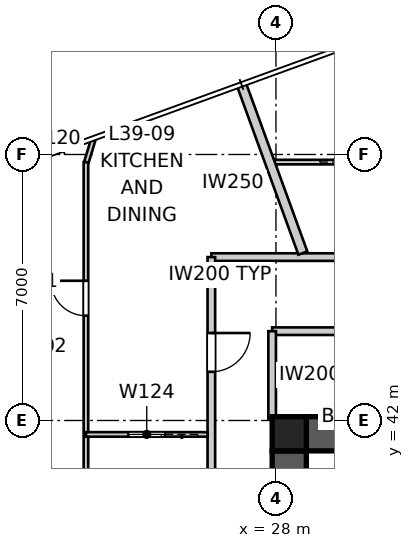
"""IFC4 building model, lengths in metres.
Left out: names, types, materials, properties, quantities, classifications, styles, units other than length and angle.
Written with IfcOpenShell. Run it as: python <this file> out.ifc"""

import sys

from ifc_helpers import new_model, si_unit, direction, frame, frame_2d, origin, origin_2d, place, context, subcontext, project, spatial, polyline, rectangle, outline, extrude, element, fill, save


model = new_model("IFC4")
c1 = context("Model", 3, precision=1e-05, world=origin(), true_north=direction((0.0, 1.0)))
c2 = subcontext(c1, "Body", "Model", "MODEL_VIEW")
j1 = project(units=[si_unit("LENGTHUNIT", "METRE"), si_unit("PLANEANGLEUNIT", "RADIAN")], contexts=[c1])
p1 = place(None, origin())
s1 = spatial("IfcSite", under=j1, at=p1, CompositionType="ELEMENT")
p2 = place(p1, origin())
s2 = spatial("IfcBuilding", under=s1, at=p2, CompositionType="ELEMENT")
p3 = place(p2, frame((0.0, 0.0, 143.8)))
s3 = spatial("IfcBuildingStorey", under=s2, at=p3, CompositionType="ELEMENT", Elevation=143.8)
p4 = place(p3, frame((28.8, 41.65, 0.0), z_axis=(0.0, 0.0, 1.0), x_axis=(1.0, 0.0, 0.0)))
e1 = element("IfcWall", 1, at=p4, inside=s3, PredefinedType="SHEAR", context=c2, shape_type="SweptSolid", body=[
    extrude(outline(polyline([(0.0, -0.45), (22.4, -0.45), (22.4, -0.025), (22.85, -0.025), (22.85, 0.025), (22.4, 0.025), (22.4, 0.45), (0.0, 0.45), (0.0, 0.025), (-0.45, 0.025), (-0.45, -0.025), (0.0, -0.025), (0.0, -0.45)])), origin(), (0.0, 0.0, 1.0), 3.4),
])
p5 = place(p3, frame((28.35, 41.2, 0.0), z_axis=(0.0, 0.0, 1.0), x_axis=(0.0, -1.0, 0.0)))
e2 = element("IfcWall", 2, at=p5, inside=s3, PredefinedType="SHEAR", context=c2, shape_type="SweptSolid", body=[
    extrude(outline(polyline([(0.0, -0.45), (22.4, -0.45), (22.4, -0.025), (22.85, -0.025), (22.85, 0.025), (22.4, 0.025), (22.4, 0.45), (0.0, 0.45), (0.0, 0.025), (-0.45, 0.025), (-0.45, -0.025), (0.0, -0.025), (0.0, -0.45)])), origin(), (0.0, 0.0, 1.0), 3.4),
])
p6 = place(p5, frame((11.14, 0.0, 0.0)))
e3 = element("IfcOpeningElement", 3, at=p6, cuts=e2, PredefinedType="OPENING", context=c2, shape_type="SweptSolid", body=[
    extrude(rectangle(XDim=1.02, YDim=2.4, at=frame_2d((0.51, 1.2))), frame((0.0, 0.46, 0.0), z_axis=(0.0, -1.0, 0.0), x_axis=(1.0, 0.0, 0.0)), (0.0, 0.0, 1.0), 0.92),
])
p7 = place(p3, frame((28.35, 41.65, 0.0), z_axis=(0.0, 0.0, 1.0), x_axis=(1.0, 0.0, 0.0)))
e4 = element("IfcColumn", 4, at=p7, inside=s3, PredefinedType="COLUMN", context=c2, shape_type="SweptSolid", body=[
    extrude(rectangle(XDim=0.9, YDim=0.9, at=origin_2d()), origin(), (0.0, 0.0, 1.0), 3.4),
])
p8 = place(p3, frame((30.758, 46.3, 0.0), z_axis=(0.0, 0.0, 1.0), x_axis=(-1.0, 0.0, 0.0)))
e5 = element("IfcWall", 5, at=p8, inside=s3, PredefinedType="PARTITIONING", context=c2, shape_type="SweptSolid", body=[
    extrude(rectangle(XDim=4.458, YDim=0.2, at=frame_2d((2.229, 0.0))), origin(), (0.0, 0.0, 1.0), 3.25),
])
p9 = place(p3, frame((26.3, 46.3, 0.0), z_axis=(0.0, 0.0, 1.0), x_axis=(0.0, -1.0, 0.0)))
e6 = element("IfcWall", 6, at=p9, inside=s3, PredefinedType="PARTITIONING", context=c2, shape_type="SweptSolid", body=[
    extrude(rectangle(XDim=33.0, YDim=0.2, at=frame_2d((16.5, 0.0))), origin(), (0.0, 0.0, 1.0), 3.25),
])
p10 = place(p9, frame((13.229, 0.0, 0.0)))
e7 = element("IfcOpeningElement", 7, at=p10, cuts=e6, PredefinedType="OPENING", context=c2, shape_type="SweptSolid", body=[
    extrude(rectangle(XDim=1.02, YDim=2.34, at=frame_2d((0.51, 1.17))), frame((0.0, 0.11, 0.0), z_axis=(0.0, -1.0, 0.0), x_axis=(1.0, 0.0, 0.0)), (0.0, 0.0, 1.0), 0.22),
])
p11 = place(p9, frame((28.51, 0.0, 0.0)))
e8 = element("IfcOpeningElement", 8, at=p11, cuts=e6, PredefinedType="OPENING", context=c2, shape_type="SweptSolid", body=[
    extrude(rectangle(XDim=1.02, YDim=2.34, at=frame_2d((0.51, 1.17))), frame((0.0, 0.11, 0.0), z_axis=(0.0, -1.0, 0.0), x_axis=(1.0, 0.0, 0.0)), (0.0, 0.0, 1.0), 0.22),
])
p12 = place(p9, frame((1.998, 0.0, 0.0)))
e9 = element("IfcOpeningElement", 9, at=p12, cuts=e6, PredefinedType="OPENING", context=c2, shape_type="SweptSolid", body=[
    extrude(rectangle(XDim=1.02, YDim=2.34, at=frame_2d((0.51, 1.17))), frame((0.0, 0.11, 0.0), z_axis=(0.0, -1.0, 0.0), x_axis=(1.0, 0.0, 0.0)), (0.0, 0.0, 1.0), 0.22),
])
p13 = place(p3, frame((27.093, 50.843, 0.0), z_axis=(0.0, 0.0, 1.0), x_axis=(0.342012883883, -0.939695262975, 0.0)))
e10 = element("IfcWall", 10, at=p13, inside=s3, PredefinedType="PARTITIONING", context=c2, shape_type="SweptSolid", body=[
    extrude(rectangle(XDim=4.722, YDim=0.25, at=frame_2d((2.361, 0.0))), origin(), (0.0, 0.0, 1.0), 3.25),
])
p14 = place(p3, frame((52.1, 44.35, 0.0), z_axis=(0.0, 0.0, 1.0), x_axis=(-1.0, 0.0, 0.0)))
e11 = element("IfcWall", 11, at=p14, inside=s3, PredefinedType="PARTITIONING", context=c2, shape_type="SweptSolid", body=[
    extrude(rectangle(XDim=24.2, YDim=0.2, at=frame_2d((12.1, 0.0))), origin(), (0.0, 0.0, 1.0), 3.25),
])
p15 = place(p14, frame((10.743, 0.0, 0.0)))
e12 = element("IfcOpeningElement", 12, at=p15, cuts=e11, PredefinedType="OPENING", context=c2, shape_type="SweptSolid", body=[
    extrude(rectangle(XDim=1.02, YDim=2.1, at=frame_2d((0.51, 1.05))), frame((0.0, 0.11, 0.0), z_axis=(0.0, -1.0, 0.0), x_axis=(1.0, 0.0, 0.0)), (0.0, 0.0, 1.0), 0.22),
])
p16 = place(p14, frame((19.636, 0.0, 0.0)))
e13 = element("IfcOpeningElement", 13, at=p16, cuts=e11, PredefinedType="OPENING", context=c2, shape_type="SweptSolid", body=[
    extrude(rectangle(XDim=1.02, YDim=2.1, at=frame_2d((0.51, 1.05))), frame((0.0, 0.11, 0.0), z_axis=(0.0, -1.0, 0.0), x_axis=(1.0, 0.0, 0.0)), (0.0, 0.0, 1.0), 0.22),
])
p17 = place(p14, frame((3.297, 0.0, 0.0)))
e14 = element("IfcOpeningElement", 14, at=p17, cuts=e11, PredefinedType="OPENING", context=c2, shape_type="SweptSolid", body=[
    extrude(rectangle(XDim=1.02, YDim=2.1, at=frame_2d((0.51, 1.05))), frame((0.0, 0.11, 0.0), z_axis=(0.0, -1.0, 0.0), x_axis=(1.0, 0.0, 0.0)), (0.0, 0.0, 1.0), 0.22),
])
p18 = place(p3, frame((27.9, 44.35, 0.0), z_axis=(0.0, 0.0, 1.0), x_axis=(0.0, -1.0, 0.0)))
e15 = element("IfcWall", 15, at=p18, inside=s3, PredefinedType="PARTITIONING", context=c2, shape_type="SweptSolid", body=[
    extrude(rectangle(XDim=2.3, YDim=0.2, at=frame_2d((1.15, 0.0))), origin(), (0.0, 0.0, 1.0), 3.25),
])
p19 = place(p3, frame((23.0, 10.8, 0.0), z_axis=(0.0, 0.0, 1.0), x_axis=(0.0, 1.0, 0.0)))
e16 = element("IfcWall", 16, at=p19, inside=s3, PredefinedType="PARTITIONING", context=c2, shape_type="SweptSolid", body=[
    extrude(rectangle(XDim=38.0, YDim=0.12, at=frame_2d((19.0, 0.0))), origin(), (0.0, 0.0, 1.0), 2.55),
])
p20 = place(p19, frame((20.674, 0.0, 0.0)))
e17 = element("IfcOpeningElement", 17, at=p20, cuts=e16, PredefinedType="OPENING", context=c2, shape_type="SweptSolid", body=[
    extrude(rectangle(XDim=0.92, YDim=2.34, at=frame_2d((0.46, 1.17))), frame((0.0, 0.07, 0.0), z_axis=(0.0, -1.0, 0.0), x_axis=(1.0, 0.0, 0.0)), (0.0, 0.0, 1.0), 0.14),
])
p21 = place(p19, frame((4.598, 0.0, 0.0)))
e18 = element("IfcOpeningElement", 18, at=p21, cuts=e16, PredefinedType="OPENING", context=c2, shape_type="SweptSolid", body=[
    extrude(rectangle(XDim=0.92, YDim=2.34, at=frame_2d((0.46, 1.17))), frame((0.0, 0.07, 0.0), z_axis=(0.0, -1.0, 0.0), x_axis=(1.0, 0.0, 0.0)), (0.0, 0.0, 1.0), 0.14),
])
p22 = place(p19, frame((8.043, 0.0, 0.0)))
e19 = element("IfcOpeningElement", 19, at=p22, cuts=e16, PredefinedType="OPENING", context=c2, shape_type="SweptSolid", body=[
    extrude(rectangle(XDim=0.92, YDim=2.34, at=frame_2d((0.46, 1.17))), frame((0.0, 0.07, 0.0), z_axis=(0.0, -1.0, 0.0), x_axis=(1.0, 0.0, 0.0)), (0.0, 0.0, 1.0), 0.14),
])
p23 = place(p19, frame((33.957, 0.0, 0.0)))
e20 = element("IfcOpeningElement", 20, at=p23, cuts=e16, PredefinedType="OPENING", context=c2, shape_type="SweptSolid", body=[
    extrude(rectangle(XDim=0.92, YDim=2.34, at=frame_2d((0.46, 1.17))), frame((0.0, 0.07, 0.0), z_axis=(0.0, -1.0, 0.0), x_axis=(1.0, 0.0, 0.0)), (0.0, 0.0, 1.0), 0.14),
])
p24 = place(p19, frame((26.957, 0.0, 0.0)))
e21 = element("IfcOpeningElement", 21, at=p24, cuts=e16, PredefinedType="OPENING", context=c2, shape_type="SweptSolid", body=[
    extrude(rectangle(XDim=0.96, YDim=2.1, at=frame_2d((0.48, 1.05))), frame((0.0, 0.07, 0.0), z_axis=(0.0, -1.0, 0.0), x_axis=(1.0, 0.0, 0.0)), (0.0, 0.0, 1.0), 0.14),
])
p25 = place(p3, frame((27.836, 48.8, 0.0), z_axis=(0.0, 0.0, 1.0), x_axis=(1.0, 0.0, 0.0)))
e22 = element("IfcWall", 22, at=p25, inside=s3, PredefinedType="PARTITIONING", context=c2, shape_type="SweptSolid", body=[
    extrude(rectangle(XDim=6.964, YDim=0.12, at=frame_2d((3.482, 0.0))), origin(), (0.0, 0.0, 1.0), 3.25),
])
p26 = place(p25, frame((5.659, 0.0, 0.0)))
e23 = element("IfcOpeningElement", 23, at=p26, cuts=e22, PredefinedType="OPENING", context=c2, shape_type="SweptSolid", body=[
    extrude(rectangle(XDim=0.92, YDim=2.34, at=frame_2d((0.46, 1.17))), frame((0.0, 0.07, 0.0), z_axis=(0.0, -1.0, 0.0), x_axis=(1.0, 0.0, 0.0)), (0.0, 0.0, 1.0), 0.14),
])
p27 = place(p25, frame((2.18, 0.0, 0.0)))
e24 = element("IfcOpeningElement", 24, at=p27, cuts=e22, PredefinedType="OPENING", context=c2, shape_type="SweptSolid", body=[
    extrude(rectangle(XDim=0.96, YDim=2.1, at=frame_2d((0.48, 1.05))), frame((0.0, 0.07, 0.0), z_axis=(0.0, -1.0, 0.0), x_axis=(1.0, 0.0, 0.0)), (0.0, 0.0, 1.0), 0.14),
])
p28 = place(p3, frame((26.2, 41.634, 0.0), z_axis=(0.0, 0.0, 1.0), x_axis=(-1.0, 0.0, 0.0)))
e25 = element("IfcWall", 25, at=p28, inside=s3, PredefinedType="PARTITIONING", context=c2, shape_type="SweptSolid", body=[
    extrude(rectangle(XDim=3.2, YDim=0.12, at=frame_2d((1.6, 0.0))), origin(), (0.0, 0.0, 1.0), 3.25),
])
p29 = place(p28, frame((1.12, 0.0, 0.0)))
e26 = element("IfcOpeningElement", 26, at=p29, cuts=e25, PredefinedType="OPENING", context=c2, shape_type="SweptSolid", body=[
    extrude(rectangle(XDim=0.96, YDim=2.1, at=frame_2d((0.48, 1.05))), frame((0.0, 0.07, 0.0), z_axis=(0.0, -1.0, 0.0), x_axis=(1.0, 0.0, 0.0)), (0.0, 0.0, 1.0), 0.14),
])
p30 = place(p3, frame((23.013, 48.8, 0.0), z_axis=(0.0, 0.0, 1.0), x_axis=(0.290455219909, 0.956888585588, 0.0)))
e27 = element("IfcWall", 27, at=p30, inside=s3, PredefinedType="PARTITIONING", context=c2, shape_type="SweptSolid", body=[
    extrude(rectangle(XDim=0.605, YDim=0.12, at=frame_2d((0.303, 0.0))), origin(), (0.0, 0.0, 1.0), 3.25),
])
p31 = place(p12, origin())
e28 = element("IfcDoor", 28, at=p31, inside=s3, OperationType="SINGLE_SWING_LEFT", PredefinedType="DOOR", context=c2, shape_type="SweptSolid", body=[
    extrude(rectangle(XDim=1.02, YDim=2.34, at=frame_2d((0.51, 1.17))), frame((0.0, 0.025, 0.0), z_axis=(0.0, -1.0, 0.0), x_axis=(1.0, 0.0, 0.0)), (0.0, 0.0, 1.0), 0.05),
])
fill(e9, e28)
p32 = place(p23, origin())
e29 = element("IfcDoor", 29, at=p32, inside=s3, OperationType="SINGLE_SWING_RIGHT", PredefinedType="DOOR", context=c2, shape_type="SweptSolid", body=[
    extrude(rectangle(XDim=0.92, YDim=2.34, at=frame_2d((0.46, 1.17))), frame((0.0, 0.025, 0.0), z_axis=(0.0, -1.0, 0.0), x_axis=(1.0, 0.0, 0.0)), (0.0, 0.0, 1.0), 0.05),
])
fill(e20, e29)
p33 = place(p29, origin())
e30 = element("IfcDoor", 30, at=p33, inside=s3, OperationType="SLIDING_TO_LEFT", PredefinedType="DOOR", context=c2, shape_type="SweptSolid", body=[
    extrude(rectangle(XDim=0.96, YDim=2.1, at=frame_2d((0.48, 1.05))), frame((0.0, 0.025, 0.0), z_axis=(0.0, -1.0, 0.0), x_axis=(1.0, 0.0, 0.0)), (0.0, 0.0, 1.0), 0.05),
])
fill(e26, e30)
save(model, sys.argv[1])
